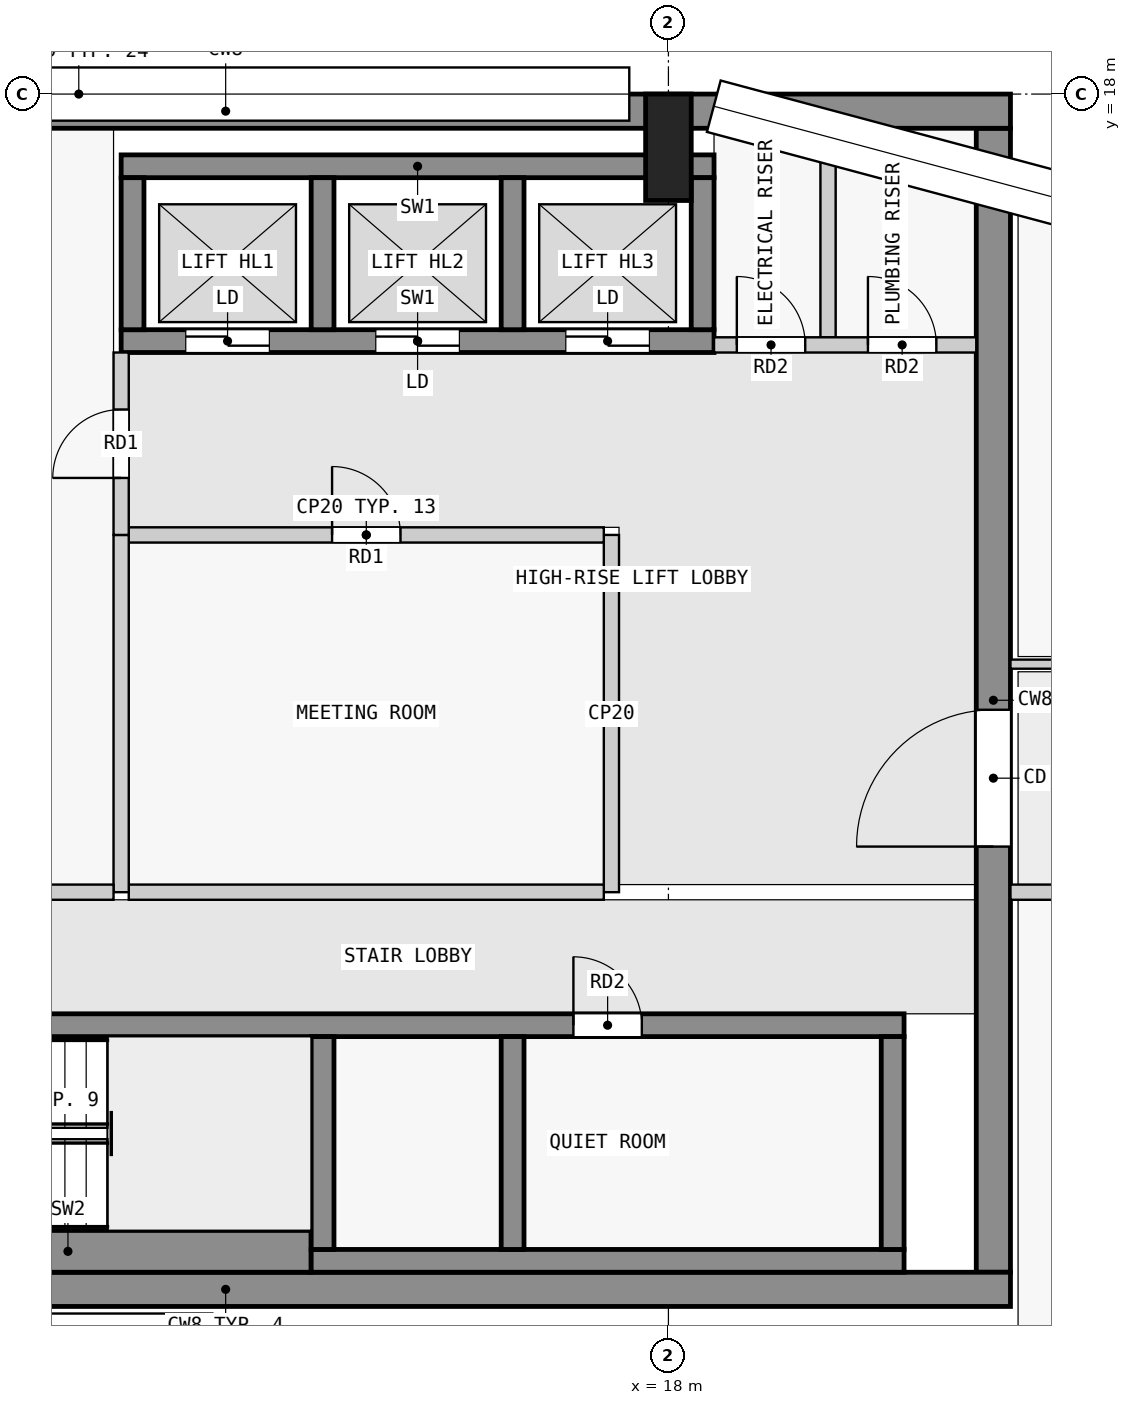
"""IFC4 building model, lengths in metres.
Left out: names, types, materials, properties, quantities, classifications, styles, units other than length and angle.
Written with IfcOpenShell. Run it as: python <this file> out.ifc"""

import sys

from ifc_helpers import new_model, si_unit, direction, frame, frame_2d, origin, origin_2d, place, context, subcontext, project, spatial, rectangle, extrude, element, fill, save


model = new_model("IFC4")
c1 = context("Model", 3, precision=1e-05, world=origin(), true_north=direction((0.0, 1.0)))
c2 = subcontext(c1, "Body", "Model", "MODEL_VIEW")
j1 = project(units=[si_unit("LENGTHUNIT", "METRE"), si_unit("PLANEANGLEUNIT", "RADIAN")], contexts=[c1])
p1 = place(None, origin())
s1 = spatial("IfcSite", under=j1, at=p1, CompositionType="ELEMENT")
p2 = place(p1, origin())
s2 = spatial("IfcBuilding", under=s1, at=p2, CompositionType="ELEMENT")
p3 = place(p2, frame((0.0, 0.0, 287.9)))
s3 = spatial("IfcBuildingStorey", under=s2, at=p3, CompositionType="ELEMENT", Elevation=287.9)
p4 = place(p3, frame((18.0, 17.3, 0.0), z_axis=(0.0, 0.0, 1.0), x_axis=(1.0, 0.0, 0.0)))
e1 = element("IfcColumn", 1, at=p4, inside=s3, PredefinedType="COLUMN", context=c2, shape_type="SweptSolid", body=[
    extrude(rectangle(XDim=0.6, YDim=1.4, at=origin_2d()), origin(), (0.0, 0.0, 1.0), 3.5),
])
for number, where, z_axis, x_axis in (
    (2, (1.85, 2.275, 0.0), (0.0, 0.0, 1.0), (1.0, 0.0, 0.0)),
    (3, (1.85, 17.775, 0.0), (0.0, 0.0, 1.0), (1.0, 0.0, 0.0)),
):
    element("IfcWall", number, at=place(p3, frame(where, z_axis=z_axis, x_axis=x_axis)), inside=s3, PredefinedType="SHEAR", context=c2, shape_type="SweptSolid", body=[
        extrude(rectangle(XDim=20.65, YDim=0.45, at=frame_2d((10.325, 0.0))), origin(), (0.0, 0.0, 1.0), 3.25),
    ])
p5 = place(p3, frame((22.275, 2.5, 0.0), z_axis=(0.0, 0.0, 1.0), x_axis=(0.0, 1.0, 0.0)))
e4 = element("IfcWall", 4, at=p5, inside=s3, PredefinedType="SHEAR", context=c2, shape_type="SweptSolid", body=[
    extrude(rectangle(XDim=15.05, YDim=0.45, at=frame_2d((7.525, 0.0))), origin(), (0.0, 0.0, 1.0), 3.25),
])
p6 = place(p5, frame((5.6, 0.0, 0.0)))
e5 = element("IfcOpeningElement", 5, at=p6, cuts=e4, PredefinedType="OPENING", context=c2, shape_type="SweptSolid", body=[
    extrude(rectangle(XDim=1.8, YDim=2.1, at=frame_2d((0.9, 1.05))), frame((0.0, 0.235, 0.0), z_axis=(0.0, -1.0, 0.0), x_axis=(1.0, 0.0, 0.0)), (0.0, 0.0, 1.0), 0.47),
])
p7 = place(p3, frame((6.9, 2.775, 0.0), z_axis=(0.0, 0.0, 1.0), x_axis=(1.0, 0.0, 0.0)))
e6 = element("IfcWall", 6, at=p7, inside=s3, PredefinedType="SHEAR", context=c2, shape_type="SweptSolid", body=[
    extrude(rectangle(XDim=6.4, YDim=0.55, at=frame_2d((3.2, 0.0))), origin(), (0.0, 0.0, 1.0), 3.25),
])
p8 = place(p3, frame((13.3, 2.65, 0.0), z_axis=(0.0, 0.0, 1.0), x_axis=(1.0, 0.0, 0.0)))
e7 = element("IfcWall", 7, at=p8, inside=s3, PredefinedType="SHEAR", context=c2, shape_type="SweptSolid", body=[
    extrude(rectangle(XDim=7.8, YDim=0.3, at=frame_2d((3.9, 0.0))), origin(), (0.0, 0.0, 1.0), 3.25),
])
for number, where, z_axis, x_axis in (
    (8, (13.45, 2.8, 0.0), (0.0, 0.0, 1.0), (0.0, 1.0, 0.0)),
    (9, (20.95, 2.8, 0.0), (0.0, 0.0, 1.0), (0.0, 1.0, 0.0)),
):
    element("IfcWall", number, at=place(p3, frame(where, z_axis=z_axis, x_axis=x_axis)), inside=s3, PredefinedType="SHEAR", context=c2, shape_type="SweptSolid", body=[
        extrude(rectangle(XDim=2.8, YDim=0.3, at=frame_2d((1.4, 0.0))), origin(), (0.0, 0.0, 1.0), 3.25),
    ])
p9 = place(p3, frame((2.3, 5.75, 0.0), z_axis=(0.0, 0.0, 1.0), x_axis=(1.0, 0.0, 0.0)))
e10 = element("IfcWall", 10, at=p9, inside=s3, PredefinedType="SHEAR", context=c2, shape_type="SweptSolid", body=[
    extrude(rectangle(XDim=18.8, YDim=0.3, at=frame_2d((9.4, 0.0))), origin(), (0.0, 0.0, 1.0), 3.25),
])
p10 = place(p9, frame((4.65, 0.0, 0.0)))
e11 = element("IfcOpeningElement", 11, at=p10, cuts=e10, PredefinedType="OPENING", context=c2, shape_type="SweptSolid", body=[
    extrude(rectangle(XDim=1.1, YDim=2.1, at=frame_2d((0.55, 1.05))), frame((0.0, 0.16, 0.0), z_axis=(0.0, -1.0, 0.0), x_axis=(1.0, 0.0, 0.0)), (0.0, 0.0, 1.0), 0.32),
])
p11 = place(p9, frame((0.45, 0.0, 0.0)))
e12 = element("IfcOpeningElement", 12, at=p11, cuts=e10, PredefinedType="OPENING", context=c2, shape_type="SweptSolid", body=[
    extrude(rectangle(XDim=1.1, YDim=2.1, at=frame_2d((0.55, 1.05))), frame((0.0, 0.16, 0.0), z_axis=(0.0, -1.0, 0.0), x_axis=(1.0, 0.0, 0.0)), (0.0, 0.0, 1.0), 0.32),
])
p12 = place(p9, frame((2.75, 0.0, 0.0)))
e13 = element("IfcOpeningElement", 13, at=p12, cuts=e10, PredefinedType="OPENING", context=c2, shape_type="SweptSolid", body=[
    extrude(rectangle(XDim=1.1, YDim=2.1, at=frame_2d((0.55, 1.05))), frame((0.0, 0.16, 0.0), z_axis=(0.0, -1.0, 0.0), x_axis=(1.0, 0.0, 0.0)), (0.0, 0.0, 1.0), 0.32),
])
p13 = place(p9, frame((14.45, 0.0, 0.0)))
e14 = element("IfcOpeningElement", 14, at=p13, cuts=e10, PredefinedType="OPENING", context=c2, shape_type="SweptSolid", body=[
    extrude(rectangle(XDim=0.9, YDim=2.1, at=frame_2d((0.45, 1.05))), frame((0.0, 0.16, 0.0), z_axis=(0.0, -1.0, 0.0), x_axis=(1.0, 0.0, 0.0)), (0.0, 0.0, 1.0), 0.32),
])
p14 = place(p3, frame((10.8, 17.05, 0.0), z_axis=(0.0, 0.0, 1.0), x_axis=(1.0, 0.0, 0.0)))
e15 = element("IfcWall", 15, at=p14, inside=s3, PredefinedType="SHEAR", context=c2, shape_type="SweptSolid", body=[
    extrude(rectangle(XDim=7.8, YDim=0.3, at=frame_2d((3.9, 0.0))), origin(), (0.0, 0.0, 1.0), 3.25),
])
p15 = place(p3, frame((10.8, 14.75, 0.0), z_axis=(0.0, 0.0, 1.0), x_axis=(1.0, 0.0, 0.0)))
e16 = element("IfcWall", 16, at=p15, inside=s3, PredefinedType="SHEAR", context=c2, shape_type="SweptSolid", body=[
    extrude(rectangle(XDim=7.8, YDim=0.3, at=frame_2d((3.9, 0.0))), origin(), (0.0, 0.0, 1.0), 3.25),
])
p16 = place(p15, frame((0.85, 0.0, 0.0)))
e17 = element("IfcOpeningElement", 17, at=p16, cuts=e16, PredefinedType="OPENING", context=c2, shape_type="SweptSolid", body=[
    extrude(rectangle(XDim=1.1, YDim=2.1, at=frame_2d((0.55, 1.05))), frame((0.0, 0.16, 0.0), z_axis=(0.0, -1.0, 0.0), x_axis=(1.0, 0.0, 0.0)), (0.0, 0.0, 1.0), 0.32),
])
p17 = place(p15, frame((3.35, 0.0, 0.0)))
e18 = element("IfcOpeningElement", 18, at=p17, cuts=e16, PredefinedType="OPENING", context=c2, shape_type="SweptSolid", body=[
    extrude(rectangle(XDim=1.1, YDim=2.1, at=frame_2d((0.55, 1.05))), frame((0.0, 0.16, 0.0), z_axis=(0.0, -1.0, 0.0), x_axis=(1.0, 0.0, 0.0)), (0.0, 0.0, 1.0), 0.32),
])
p18 = place(p15, frame((5.85, 0.0, 0.0)))
e19 = element("IfcOpeningElement", 19, at=p18, cuts=e16, PredefinedType="OPENING", context=c2, shape_type="SweptSolid", body=[
    extrude(rectangle(XDim=1.1, YDim=2.1, at=frame_2d((0.55, 1.05))), frame((0.0, 0.16, 0.0), z_axis=(0.0, -1.0, 0.0), x_axis=(1.0, 0.0, 0.0)), (0.0, 0.0, 1.0), 0.32),
])
for number, where, z_axis, x_axis in (
    (20, (10.95, 14.9, 0.0), (0.0, 0.0, 1.0), (0.0, 1.0, 0.0)),
    (21, (13.45, 14.9, 0.0), (0.0, 0.0, 1.0), (0.0, 1.0, 0.0)),
    (22, (15.95, 14.9, 0.0), (0.0, 0.0, 1.0), (0.0, 1.0, 0.0)),
    (23, (18.45, 14.9, 0.0), (0.0, 0.0, 1.0), (0.0, 1.0, 0.0)),
):
    element("IfcWall", number, at=place(p3, frame(where, z_axis=z_axis, x_axis=x_axis)), inside=s3, PredefinedType="SHEAR", context=c2, shape_type="SweptSolid", body=[
        extrude(rectangle(XDim=2.0, YDim=0.3, at=frame_2d((1.0, 0.0))), origin(), (0.0, 0.0, 1.0), 3.25),
    ])
p19 = place(p3, frame((7.1, 7.5, 0.0), z_axis=(0.0, 0.0, 1.0), x_axis=(1.0, 0.0, 0.0)))
e24 = element("IfcWall", 24, at=p19, inside=s3, PredefinedType="PARTITIONING", context=c2, shape_type="SweptSolid", body=[
    extrude(rectangle(XDim=3.6, YDim=0.2, at=frame_2d((1.8, 0.0))), origin(), (0.0, 0.0, 1.0), 3.25),
])
p20 = place(p3, frame((10.8, 12.2, 0.0), z_axis=(0.0, 0.0, 1.0), x_axis=(0.0, 1.0, 0.0)))
e25 = element("IfcWall", 25, at=p20, inside=s3, PredefinedType="PARTITIONING", context=c2, shape_type="SweptSolid", body=[
    extrude(rectangle(XDim=2.4, YDim=0.2, at=frame_2d((1.2, 0.0))), origin(), (0.0, 0.0, 1.0), 3.25),
])
p21 = place(p20, frame((0.75, 0.0, 0.0)))
e26 = element("IfcOpeningElement", 26, at=p21, cuts=e25, PredefinedType="OPENING", context=c2, shape_type="SweptSolid", body=[
    extrude(rectangle(XDim=0.9, YDim=2.1, at=frame_2d((0.45, 1.05))), frame((0.0, 0.11, 0.0), z_axis=(0.0, -1.0, 0.0), x_axis=(1.0, 0.0, 0.0)), (0.0, 0.0, 1.0), 0.22),
])
p22 = place(p3, frame((10.8, 7.5, 0.0), z_axis=(0.0, 0.0, 1.0), x_axis=(0.0, 1.0, 0.0)))
e27 = element("IfcWall", 27, at=p22, inside=s3, PredefinedType="PARTITIONING", context=c2, shape_type="SweptSolid", body=[
    extrude(rectangle(XDim=4.7, YDim=0.2, at=frame_2d((2.35, 0.0))), origin(), (0.0, 0.0, 1.0), 3.25),
])
p23 = place(p3, frame((10.9, 7.5, 0.0), z_axis=(0.0, 0.0, 1.0), x_axis=(1.0, 0.0, 0.0)))
e28 = element("IfcWall", 28, at=p23, inside=s3, PredefinedType="PARTITIONING", context=c2, shape_type="SweptSolid", body=[
    extrude(rectangle(XDim=6.25, YDim=0.2, at=frame_2d((3.125, 0.0))), origin(), (0.0, 0.0, 1.0), 3.25),
])
p24 = place(p3, frame((17.25, 7.5, 0.0), z_axis=(0.0, 0.0, 1.0), x_axis=(0.0, 1.0, 0.0)))
e29 = element("IfcWall", 29, at=p24, inside=s3, PredefinedType="PARTITIONING", context=c2, shape_type="SweptSolid", body=[
    extrude(rectangle(XDim=4.7, YDim=0.2, at=frame_2d((2.35, 0.0))), origin(), (0.0, 0.0, 1.0), 3.25),
])
p25 = place(p3, frame((10.9, 12.2, 0.0), z_axis=(0.0, 0.0, 1.0), x_axis=(1.0, 0.0, 0.0)))
e30 = element("IfcWall", 30, at=p25, inside=s3, PredefinedType="PARTITIONING", context=c2, shape_type="SweptSolid", body=[
    extrude(rectangle(XDim=6.25, YDim=0.2, at=frame_2d((3.125, 0.0))), origin(), (0.0, 0.0, 1.0), 3.25),
])
p26 = place(p25, frame((2.675, 0.0, 0.0)))
e31 = element("IfcOpeningElement", 31, at=p26, cuts=e30, PredefinedType="OPENING", context=c2, shape_type="SweptSolid", body=[
    extrude(rectangle(XDim=0.9, YDim=2.1, at=frame_2d((0.45, 1.05))), frame((0.0, 0.11, 0.0), z_axis=(0.0, -1.0, 0.0), x_axis=(1.0, 0.0, 0.0)), (0.0, 0.0, 1.0), 0.22),
])
p27 = place(p3, frame((18.6, 14.7, 0.0), z_axis=(0.0, 0.0, 1.0), x_axis=(1.0, 0.0, 0.0)))
e32 = element("IfcWall", 32, at=p27, inside=s3, PredefinedType="PARTITIONING", context=c2, shape_type="SweptSolid", body=[
    extrude(rectangle(XDim=3.45, YDim=0.2, at=frame_2d((1.725, 0.0))), origin(), (0.0, 0.0, 1.0), 3.25),
])
p28 = place(p27, frame((0.3, 0.0, 0.0)))
e33 = element("IfcOpeningElement", 33, at=p28, cuts=e32, PredefinedType="OPENING", context=c2, shape_type="SweptSolid", body=[
    extrude(rectangle(XDim=0.9, YDim=2.1, at=frame_2d((0.45, 1.05))), frame((0.0, 0.11, 0.0), z_axis=(0.0, -1.0, 0.0), x_axis=(1.0, 0.0, 0.0)), (0.0, 0.0, 1.0), 0.22),
])
p29 = place(p27, frame((2.025, 0.0, 0.0)))
e34 = element("IfcOpeningElement", 34, at=p29, cuts=e32, PredefinedType="OPENING", context=c2, shape_type="SweptSolid", body=[
    extrude(rectangle(XDim=0.9, YDim=2.1, at=frame_2d((0.45, 1.05))), frame((0.0, 0.11, 0.0), z_axis=(0.0, -1.0, 0.0), x_axis=(1.0, 0.0, 0.0)), (0.0, 0.0, 1.0), 0.22),
])
p30 = place(p3, frame((20.1, 14.8, 0.0), z_axis=(0.0, 0.0, 1.0), x_axis=(0.0, 1.0, 0.0)))
e35 = element("IfcWall", 35, at=p30, inside=s3, PredefinedType="PARTITIONING", context=c2, shape_type="SweptSolid", body=[
    extrude(rectangle(XDim=2.75, YDim=0.2, at=frame_2d((1.375, 0.0))), origin(), (0.0, 0.0, 1.0), 3.25),
])
p31 = place(p3, frame((22.5, 10.5, 0.0), z_axis=(0.0, 0.0, 1.0), x_axis=(1.0, 0.0, 0.0)))
e36 = element("IfcWall", 36, at=p31, inside=s3, PredefinedType="PARTITIONING", context=c2, shape_type="SweptSolid", body=[
    extrude(rectangle(XDim=4.5, YDim=0.12, at=frame_2d((2.25, 0.0))), origin(), (0.0, 0.0, 1.0), 3.25),
])
p32 = place(p31, frame((1.85, 0.0, 0.0)))
e37 = element("IfcOpeningElement", 37, at=p32, cuts=e36, PredefinedType="OPENING", context=c2, shape_type="SweptSolid", body=[
    extrude(rectangle(XDim=1.0, YDim=2.1, at=frame_2d((0.5, 1.05))), frame((0.0, 0.07, 0.0), z_axis=(0.0, -1.0, 0.0), x_axis=(1.0, 0.0, 0.0)), (0.0, 0.0, 1.0), 0.14),
])
p33 = place(p3, frame((27.0, 7.5, 0.0), z_axis=(0.0, 0.0, 1.0), x_axis=(-1.0, 0.0, 0.0)))
e38 = element("IfcWall", 38, at=p33, inside=s3, PredefinedType="PARTITIONING", context=c2, shape_type="SweptSolid", body=[
    extrude(rectangle(XDim=4.5, YDim=0.2, at=frame_2d((2.25, 0.0))), origin(), (0.0, 0.0, 1.0), 3.25),
])
p34 = place(p3, frame((15.95, 2.8, 0.0), z_axis=(0.0, 0.0, 1.0), x_axis=(0.0, 1.0, 0.0)))
e39 = element("IfcWall", 39, at=p34, inside=s3, PredefinedType="SHEAR", context=c2, shape_type="SweptSolid", body=[
    extrude(rectangle(XDim=2.8, YDim=0.3, at=frame_2d((1.4, 0.0))), origin(), (0.0, 0.0, 1.0), 3.25),
])
p35 = place(p21, origin())
e40 = element("IfcDoor", 40, at=p35, inside=s3, OperationType="SINGLE_SWING_LEFT", PredefinedType="DOOR", context=c2, shape_type="SweptSolid", body=[
    extrude(rectangle(XDim=0.9, YDim=2.1, at=frame_2d((0.45, 1.05))), frame((0.0, 0.025, 0.0), z_axis=(0.0, -1.0, 0.0), x_axis=(1.0, 0.0, 0.0)), (0.0, 0.0, 1.0), 0.05),
])
fill(e26, e40)
p36 = place(p26, origin())
e41 = element("IfcDoor", 41, at=p36, inside=s3, OperationType="SINGLE_SWING_LEFT", PredefinedType="DOOR", context=c2, shape_type="SweptSolid", body=[
    extrude(rectangle(XDim=0.9, YDim=2.1, at=frame_2d((0.45, 1.05))), frame((0.0, 0.025, 0.0), z_axis=(0.0, -1.0, 0.0), x_axis=(1.0, 0.0, 0.0)), (0.0, 0.0, 1.0), 0.05),
])
fill(e31, e41)
p37 = place(p16, origin())
e42 = element("IfcDoor", 42, at=p37, inside=s3, OperationType="DOUBLE_DOOR_SLIDING", PredefinedType="DOOR", context=c2, shape_type="SweptSolid", body=[
    extrude(rectangle(XDim=1.1, YDim=2.1, at=frame_2d((0.55, 1.05))), frame((0.0, 0.025, 0.0), z_axis=(0.0, -1.0, 0.0), x_axis=(1.0, 0.0, 0.0)), (0.0, 0.0, 1.0), 0.05),
])
fill(e17, e42)
p38 = place(p17, origin())
e43 = element("IfcDoor", 43, at=p38, inside=s3, OperationType="DOUBLE_DOOR_SLIDING", PredefinedType="DOOR", context=c2, shape_type="SweptSolid", body=[
    extrude(rectangle(XDim=1.1, YDim=2.1, at=frame_2d((0.55, 1.05))), frame((0.0, 0.025, 0.0), z_axis=(0.0, -1.0, 0.0), x_axis=(1.0, 0.0, 0.0)), (0.0, 0.0, 1.0), 0.05),
])
fill(e18, e43)
p39 = place(p18, origin())
e44 = element("IfcDoor", 44, at=p39, inside=s3, OperationType="DOUBLE_DOOR_SLIDING", PredefinedType="DOOR", context=c2, shape_type="SweptSolid", body=[
    extrude(rectangle(XDim=1.1, YDim=2.1, at=frame_2d((0.55, 1.05))), frame((0.0, 0.025, 0.0), z_axis=(0.0, -1.0, 0.0), x_axis=(1.0, 0.0, 0.0)), (0.0, 0.0, 1.0), 0.05),
])
fill(e19, e44)
p40 = place(p6, origin())
e45 = element("IfcDoor", 45, at=p40, inside=s3, OperationType="DOUBLE_DOOR_SINGLE_SWING", PredefinedType="DOOR", context=c2, shape_type="SweptSolid", body=[
    extrude(rectangle(XDim=1.8, YDim=2.1, at=frame_2d((0.9, 1.05))), frame((0.0, 0.025, 0.0), z_axis=(0.0, -1.0, 0.0), x_axis=(1.0, 0.0, 0.0)), (0.0, 0.0, 1.0), 0.05),
])
fill(e5, e45)
p41 = place(p28, origin())
e46 = element("IfcDoor", 46, at=p41, inside=s3, OperationType="SINGLE_SWING_LEFT", PredefinedType="DOOR", context=c2, shape_type="SweptSolid", body=[
    extrude(rectangle(XDim=0.9, YDim=2.1, at=frame_2d((0.45, 1.05))), frame((0.0, 0.025, 0.0), z_axis=(0.0, -1.0, 0.0), x_axis=(1.0, 0.0, 0.0)), (0.0, 0.0, 1.0), 0.05),
])
fill(e33, e46)
p42 = place(p29, origin())
e47 = element("IfcDoor", 47, at=p42, inside=s3, OperationType="SINGLE_SWING_LEFT", PredefinedType="DOOR", context=c2, shape_type="SweptSolid", body=[
    extrude(rectangle(XDim=0.9, YDim=2.1, at=frame_2d((0.45, 1.05))), frame((0.0, 0.025, 0.0), z_axis=(0.0, -1.0, 0.0), x_axis=(1.0, 0.0, 0.0)), (0.0, 0.0, 1.0), 0.05),
])
fill(e34, e47)
p43 = place(p13, origin())
e48 = element("IfcDoor", 48, at=p43, inside=s3, OperationType="SINGLE_SWING_LEFT", PredefinedType="DOOR", context=c2, shape_type="SweptSolid", body=[
    extrude(rectangle(XDim=0.9, YDim=2.1, at=frame_2d((0.45, 1.05))), frame((0.0, 0.025, 0.0), z_axis=(0.0, -1.0, 0.0), x_axis=(1.0, 0.0, 0.0)), (0.0, 0.0, 1.0), 0.05),
])
fill(e14, e48)
save(model, sys.argv[1])
